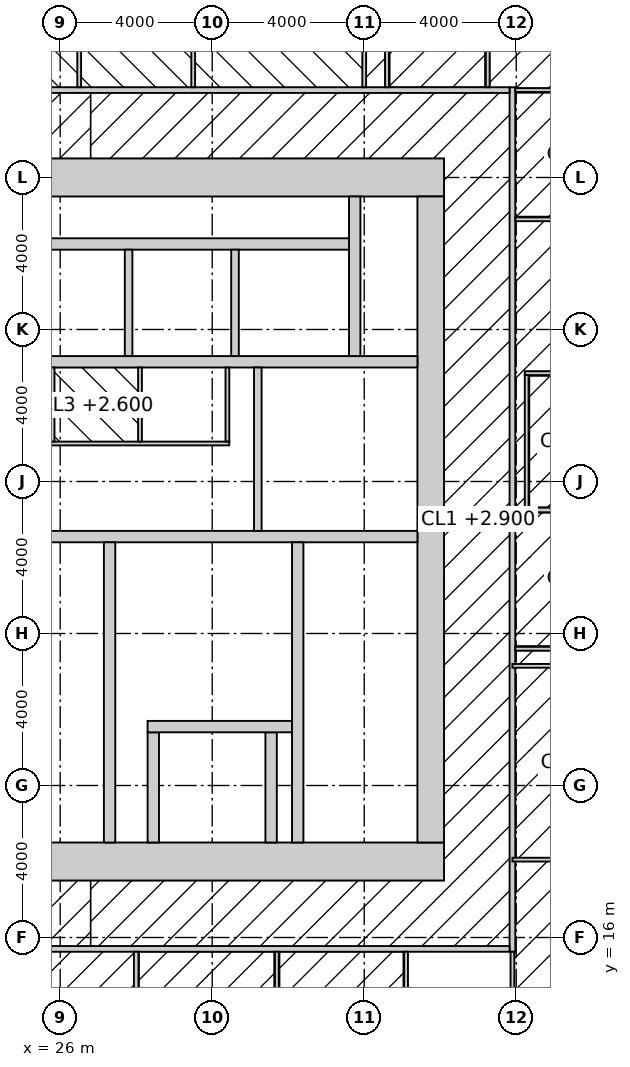
"""IFC4 building model, lengths in metres.
Left out: names, types, materials, properties, quantities, classifications, styles, units other than length and angle.
Written with IfcOpenShell. Run it as: python <this file> out.ifc"""

import sys

from ifc_helpers import new_model, si_unit, direction, frame, frame_2d, origin, place, context, subcontext, project, spatial, rectangle, extrude, element, fill, save


model = new_model("IFC4")
c1 = context("Model", 3, precision=1e-05, world=origin(), true_north=direction((0.0, 1.0)))
c2 = subcontext(c1, "Body", "Model", "MODEL_VIEW")
j1 = project(units=[si_unit("LENGTHUNIT", "METRE"), si_unit("PLANEANGLEUNIT", "RADIAN")], contexts=[c1])
p1 = place(None, origin())
s1 = spatial("IfcSite", under=j1, at=p1, CompositionType="ELEMENT")
p2 = place(p1, origin())
s2 = spatial("IfcBuilding", under=s1, at=p2, CompositionType="ELEMENT")
p3 = place(p2, frame((0.0, 0.0, 93.4)))
s3 = spatial("IfcBuildingStorey", under=s2, at=p3, CompositionType="ELEMENT", Elevation=93.4)
p4 = place(p3, frame((18.5, 18.0, -0.15), z_axis=(0.0, 0.0, 1.0), x_axis=(1.0, 0.0, 0.0)))
e1 = element("IfcWall", 1, at=p4, inside=s3, PredefinedType="SHEAR", context=c2, shape_type="SweptSolid", body=[
    extrude(rectangle(XDim=17.6, YDim=1.0, at=frame_2d((8.8, 0.0))), origin(), (0.0, 0.0, 1.0), 4.0),
])
p5 = place(p4, frame((3.45, 0.0, 0.15)))
e2 = element("IfcOpeningElement", 2, at=p5, cuts=e1, PredefinedType="OPENING", context=c2, shape_type="SweptSolid", body=[
    extrude(rectangle(XDim=1.5, YDim=2.4, at=frame_2d((0.75, 1.2))), frame((0.0, 0.51, 0.0), z_axis=(0.0, -1.0, 0.0), x_axis=(1.0, 0.0, 0.0)), (0.0, 0.0, 1.0), 1.02),
])
p6 = place(p3, frame((18.5, 36.0, -0.15), z_axis=(0.0, 0.0, 1.0), x_axis=(1.0, 0.0, 0.0)))
e3 = element("IfcWall", 3, at=p6, inside=s3, PredefinedType="SHEAR", context=c2, shape_type="SweptSolid", body=[
    extrude(rectangle(XDim=17.6, YDim=1.0, at=frame_2d((8.8, 0.0))), origin(), (0.0, 0.0, 1.0), 4.0),
])
p7 = place(p3, frame((35.75, 18.5, -0.15), z_axis=(0.0, 0.0, 1.0), x_axis=(0.0, 1.0, 0.0)))
e4 = element("IfcWall", 4, at=p7, inside=s3, PredefinedType="SHEAR", context=c2, shape_type="SweptSolid", body=[
    extrude(rectangle(XDim=17.0, YDim=0.7, at=frame_2d((8.5, 0.0))), origin(), (0.0, 0.0, 1.0), 4.0),
])
p8 = place(p7, frame((9.85, 0.0, 0.15)))
e5 = element("IfcOpeningElement", 5, at=p8, cuts=e4, PredefinedType="OPENING", context=c2, shape_type="SweptSolid", body=[
    extrude(rectangle(XDim=1.0, YDim=2.2, at=frame_2d((0.5, 1.1))), frame((0.0, 0.36, 0.0), z_axis=(0.0, -1.0, 0.0), x_axis=(1.0, 0.0, 0.0)), (0.0, 0.0, 1.0), 0.72),
])
p9 = place(p3, frame((24.15, 26.55, -0.15), z_axis=(0.0, 0.0, 1.0), x_axis=(1.0, 0.0, 0.0)))
e6 = element("IfcWall", 6, at=p9, inside=s3, PredefinedType="SHEAR", context=c2, shape_type="SweptSolid", body=[
    extrude(rectangle(XDim=11.25, YDim=0.3, at=frame_2d((5.625, 0.0))), origin(), (0.0, 0.0, 1.0), 4.0),
])
p10 = place(p9, frame((9.25, 0.0, 0.15)))
e7 = element("IfcOpeningElement", 7, at=p10, cuts=e6, PredefinedType="OPENING", context=c2, shape_type="SweptSolid", body=[
    extrude(rectangle(XDim=1.0, YDim=2.2, at=frame_2d((0.5, 1.1))), frame((0.0, 0.16, 0.0), z_axis=(0.0, -1.0, 0.0), x_axis=(1.0, 0.0, 0.0)), (0.0, 0.0, 1.0), 0.32),
])
p11 = place(p9, frame((4.9, 0.0, 0.15)))
e8 = element("IfcOpeningElement", 8, at=p11, cuts=e6, PredefinedType="OPENING", context=c2, shape_type="SweptSolid", body=[
    extrude(rectangle(XDim=1.5, YDim=2.4, at=frame_2d((0.75, 1.2))), frame((0.0, 0.16, 0.0), z_axis=(0.0, -1.0, 0.0), x_axis=(1.0, 0.0, 0.0)), (0.0, 0.0, 1.0), 0.32),
])
p12 = place(p3, frame((27.3, 18.5, -0.15), z_axis=(0.0, 0.0, 1.0), x_axis=(0.0, 1.0, 0.0)))
e9 = element("IfcWall", 9, at=p12, inside=s3, PredefinedType="SHEAR", context=c2, shape_type="SweptSolid", body=[
    extrude(rectangle(XDim=7.9, YDim=0.3, at=frame_2d((3.95, 0.0))), origin(), (0.0, 0.0, 1.0), 4.0),
])
p13 = place(p12, frame((6.4, 0.0, 0.15)))
e10 = element("IfcOpeningElement", 10, at=p13, cuts=e9, PredefinedType="OPENING", context=c2, shape_type="SweptSolid", body=[
    extrude(rectangle(XDim=1.0, YDim=2.2, at=frame_2d((0.5, 1.1))), frame((0.0, 0.16, 0.0), z_axis=(0.0, -1.0, 0.0), x_axis=(1.0, 0.0, 0.0)), (0.0, 0.0, 1.0), 0.32),
])
p14 = place(p3, frame((32.25, 18.5, -0.15), z_axis=(0.0, 0.0, 1.0), x_axis=(0.0, 1.0, 0.0)))
e11 = element("IfcWall", 11, at=p14, inside=s3, PredefinedType="SHEAR", context=c2, shape_type="SweptSolid", body=[
    extrude(rectangle(XDim=7.9, YDim=0.3, at=frame_2d((3.95, 0.0))), origin(), (0.0, 0.0, 1.0), 4.0),
])
for number, where, z_axis, x_axis in (
    (12, (28.45, 18.5, -0.15), (0.0, 0.0, 1.0), (0.0, 1.0, 0.0)),
    (13, (31.55, 18.5, -0.15), (0.0, 0.0, 1.0), (0.0, 1.0, 0.0)),
):
    element("IfcWall", number, at=place(p3, frame(where, z_axis=z_axis, x_axis=x_axis)), inside=s3, PredefinedType="SHEAR", context=c2, shape_type="SweptSolid", body=[
        extrude(rectangle(XDim=2.9, YDim=0.3, at=frame_2d((1.45, 0.0))), origin(), (0.0, 0.0, 1.0), 4.0),
    ])
p15 = place(p3, frame((28.3, 21.55, -0.15), z_axis=(0.0, 0.0, 1.0), x_axis=(1.0, 0.0, 0.0)))
e14 = element("IfcWall", 14, at=p15, inside=s3, PredefinedType="SHEAR", context=c2, shape_type="SweptSolid", body=[
    extrude(rectangle(XDim=3.8, YDim=0.3, at=frame_2d((1.9, 0.0))), origin(), (0.0, 0.0, 1.0), 4.0),
])
p16 = place(p15, frame((1.05, 0.0, 0.15)))
e15 = element("IfcOpeningElement", 15, at=p16, cuts=e14, PredefinedType="OPENING", context=c2, shape_type="SweptSolid", body=[
    extrude(rectangle(XDim=1.3, YDim=2.4, at=frame_2d((0.65, 1.2))), frame((0.0, 0.16, 0.0), z_axis=(0.0, -1.0, 0.0), x_axis=(1.0, 0.0, 0.0)), (0.0, 0.0, 1.0), 0.32),
])
p17 = place(p3, frame((24.15, 31.15, -0.15), z_axis=(0.0, 0.0, 1.0), x_axis=(1.0, 0.0, 0.0)))
e16 = element("IfcWall", 16, at=p17, inside=s3, PredefinedType="SHEAR", context=c2, shape_type="SweptSolid", body=[
    extrude(rectangle(XDim=11.25, YDim=0.3, at=frame_2d((5.625, 0.0))), origin(), (0.0, 0.0, 1.0), 4.0),
])
p18 = place(p17, frame((7.25, 0.0, 0.15)))
e17 = element("IfcOpeningElement", 17, at=p18, cuts=e16, PredefinedType="OPENING", context=c2, shape_type="SweptSolid", body=[
    extrude(rectangle(XDim=1.4, YDim=2.4, at=frame_2d((0.7, 1.2))), frame((0.0, 0.16, 0.0), z_axis=(0.0, -1.0, 0.0), x_axis=(1.0, 0.0, 0.0)), (0.0, 0.0, 1.0), 0.32),
])
p19 = place(p3, frame((33.75, 31.3, -0.15), z_axis=(0.0, 0.0, 1.0), x_axis=(0.0, 1.0, 0.0)))
e18 = element("IfcWall", 18, at=p19, inside=s3, PredefinedType="SHEAR", context=c2, shape_type="SweptSolid", body=[
    extrude(rectangle(XDim=4.2, YDim=0.3, at=frame_2d((2.1, 0.0))), origin(), (0.0, 0.0, 1.0), 4.0),
])
p20 = place(p3, frame((25.0, 34.25, -0.15), z_axis=(0.0, 0.0, 1.0), x_axis=(1.0, 0.0, 0.0)))
e19 = element("IfcWall", 19, at=p20, inside=s3, PredefinedType="SHEAR", context=c2, shape_type="SweptSolid", body=[
    extrude(rectangle(XDim=8.6, YDim=0.3, at=frame_2d((4.3, 0.0))), origin(), (0.0, 0.0, 1.0), 4.0),
])
for number, where, z_axis, x_axis in (
    (20, (27.8, 31.3, -0.15), (0.0, 0.0, 1.0), (0.0, 1.0, 0.0)),
    (21, (30.6, 31.3, -0.15), (0.0, 0.0, 1.0), (0.0, 1.0, 0.0)),
):
    element("IfcWall", number, at=place(p3, frame(where, z_axis=z_axis, x_axis=x_axis)), inside=s3, PredefinedType="SOLIDWALL", context=c2, shape_type="SweptSolid", body=[
        extrude(rectangle(XDim=2.8, YDim=0.2, at=frame_2d((1.4, 0.0))), origin(), (0.0, 0.0, 1.0), 4.0),
    ])
p21 = place(p3, frame((31.2, 26.7, 0.0), z_axis=(0.0, 0.0, 1.0), x_axis=(0.0, 1.0, 0.0)))
e22 = element("IfcWall", 22, at=p21, inside=s3, PredefinedType="SOLIDWALL", context=c2, shape_type="SweptSolid", body=[
    extrude(rectangle(XDim=4.3, YDim=0.2, at=frame_2d((2.15, 0.0))), origin(), (0.0, 0.0, 1.0), 3.85),
])
p22 = place(p3, frame((25.75, 29.0, 0.0), z_axis=(0.0, 0.0, 1.0), x_axis=(1.0, 0.0, 0.0)))
e23 = element("IfcWall", 23, at=p22, inside=s3, PredefinedType="PARTITIONING", context=c2, shape_type="SweptSolid", body=[
    extrude(rectangle(XDim=4.7, YDim=0.1, at=frame_2d((2.35, 0.0))), origin(), (0.0, 0.0, 1.0), 3.85),
])
p23 = place(p22, frame((0.7, 0.0, 0.0)))
e24 = element("IfcOpeningElement", 24, at=p23, cuts=e23, PredefinedType="OPENING", context=c2, shape_type="SweptSolid", body=[
    extrude(rectangle(XDim=1.0, YDim=2.2, at=frame_2d((0.5, 1.1))), frame((0.0, 0.06, 0.0), z_axis=(0.0, -1.0, 0.0), x_axis=(1.0, 0.0, 0.0)), (0.0, 0.0, 1.0), 0.12),
])
p24 = place(p22, frame((3.0, 0.0, 0.0)))
e25 = element("IfcOpeningElement", 25, at=p24, cuts=e23, PredefinedType="OPENING", context=c2, shape_type="SweptSolid", body=[
    extrude(rectangle(XDim=1.0, YDim=2.2, at=frame_2d((0.5, 1.1))), frame((0.0, 0.06, 0.0), z_axis=(0.0, -1.0, 0.0), x_axis=(1.0, 0.0, 0.0)), (0.0, 0.0, 1.0), 0.12),
])
for number, where, z_axis, x_axis in (
    (26, (25.8, 29.05, 0.0), (0.0, 0.0, 1.0), (0.0, 1.0, 0.0)),
    (27, (30.4, 29.05, 0.0), (0.0, 0.0, 1.0), (0.0, 1.0, 0.0)),
    (28, (28.1, 29.05, 0.0), (0.0, 0.0, 1.0), (0.0, 1.0, 0.0)),
):
    element("IfcWall", number, at=place(p3, frame(where, z_axis=z_axis, x_axis=x_axis)), inside=s3, PredefinedType="PARTITIONING", context=c2, shape_type="SweptSolid", body=[
        extrude(rectangle(XDim=1.95, YDim=0.1, at=frame_2d((0.975, 0.0))), origin(), (0.0, 0.0, 1.0), 3.85),
    ])
p25 = place(p3, frame((37.9, 15.625, 0.0), z_axis=(0.0, 0.0, 1.0), x_axis=(0.0, 1.0, 0.0)))
e29 = element("IfcWall", 29, at=p25, inside=s3, PredefinedType="PARTITIONING", context=c2, shape_type="SweptSolid", body=[
    extrude(rectangle(XDim=22.75, YDim=0.15, at=frame_2d((11.375, 0.0))), origin(), (0.0, 0.0, 1.0), 2.95),
])
p26 = place(p25, frame((4.974, 0.0, 0.0)))
e30 = element("IfcOpeningElement", 30, at=p26, cuts=e29, PredefinedType="OPENING", context=c2, shape_type="SweptSolid", body=[
    extrude(rectangle(XDim=1.8, YDim=2.4, at=frame_2d((0.9, 1.2))), frame((0.0, 0.085, 0.0), z_axis=(0.0, -1.0, 0.0), x_axis=(1.0, 0.0, 0.0)), (0.0, 0.0, 1.0), 0.17),
])
p27 = place(p25, frame((16.226, 0.0, 0.0)))
e31 = element("IfcOpeningElement", 31, at=p27, cuts=e29, PredefinedType="OPENING", context=c2, shape_type="SweptSolid", body=[
    extrude(rectangle(XDim=1.8, YDim=2.4, at=frame_2d((0.9, 1.2))), frame((0.0, 0.085, 0.0), z_axis=(0.0, -1.0, 0.0), x_axis=(1.0, 0.0, 0.0)), (0.0, 0.0, 1.0), 0.17),
])
p28 = place(p3, frame((15.775, 15.7, 0.0), z_axis=(0.0, 0.0, 1.0), x_axis=(1.0, 0.0, 0.0)))
e32 = element("IfcWall", 32, at=p28, inside=s3, PredefinedType="PARTITIONING", context=c2, shape_type="SweptSolid", body=[
    extrude(rectangle(XDim=22.05, YDim=0.15, at=frame_2d((11.025, 0.0))), origin(), (0.0, 0.0, 1.0), 3.85),
])
p29 = place(p3, frame((15.775, 38.3, 0.0), z_axis=(0.0, 0.0, 1.0), x_axis=(1.0, 0.0, 0.0)))
e33 = element("IfcWall", 33, at=p29, inside=s3, PredefinedType="PARTITIONING", context=c2, shape_type="SweptSolid", body=[
    extrude(rectangle(XDim=22.05, YDim=0.15, at=frame_2d((11.025, 0.0))), origin(), (0.0, 0.0, 1.0), 3.85),
])
p30 = place(p29, frame((7.975, 0.0, 0.0)))
e34 = element("IfcOpeningElement", 34, at=p30, cuts=e33, PredefinedType="OPENING", context=c2, shape_type="SweptSolid", body=[
    extrude(rectangle(XDim=0.9, YDim=2.1, at=frame_2d((0.45, 1.05))), frame((0.0, 0.085, 0.0), z_axis=(0.0, -1.0, 0.0), x_axis=(1.0, 0.0, 0.0)), (0.0, 0.0, 1.0), 0.17),
])
p31 = place(p29, frame((11.725, 0.0, 0.0)))
e35 = element("IfcOpeningElement", 35, at=p31, cuts=e33, PredefinedType="OPENING", context=c2, shape_type="SweptSolid", body=[
    extrude(rectangle(XDim=1.0, YDim=2.1, at=frame_2d((0.5, 1.05))), frame((0.0, 0.085, 0.0), z_axis=(0.0, -1.0, 0.0), x_axis=(1.0, 0.0, 0.0)), (0.0, 0.0, 1.0), 0.17),
])
p32 = place(p29, frame((15.575, 0.0, 0.0)))
e36 = element("IfcOpeningElement", 36, at=p32, cuts=e33, PredefinedType="OPENING", context=c2, shape_type="SweptSolid", body=[
    extrude(rectangle(XDim=0.9, YDim=2.1, at=frame_2d((0.45, 1.05))), frame((0.0, 0.085, 0.0), z_axis=(0.0, -1.0, 0.0), x_axis=(1.0, 0.0, 0.0)), (0.0, 0.0, 1.0), 0.17),
])
p33 = place(p3, frame((34.0, 38.375, 0.0), z_axis=(0.0, 0.0, 1.0), x_axis=(0.0, 1.0, 0.0)))
e37 = element("IfcWall", 37, at=p33, inside=s3, PredefinedType="PARTITIONING", context=c2, shape_type="SweptSolid", body=[
    extrude(rectangle(XDim=3.675, YDim=0.1, at=frame_2d((1.837, 0.0))), origin(), (0.0, 0.0, 1.0), 2.95),
])
for number, where, z_axis, x_axis in (
    (38, (26.5, 38.375, 0.0), (0.0, 0.0, 1.0), (0.0, 1.0, 0.0)),
    (39, (29.5, 38.375, 0.0), (0.0, 0.0, 1.0), (0.0, 1.0, 0.0)),
):
    element("IfcWall", number, at=place(p3, frame(where, z_axis=z_axis, x_axis=x_axis)), inside=s3, PredefinedType="PARTITIONING", context=c2, shape_type="SweptSolid", body=[
        extrude(rectangle(XDim=3.575, YDim=0.1, at=frame_2d((1.788, 0.0))), origin(), (0.0, 0.0, 1.0), 3.85),
    ])
p34 = place(p3, frame((28.0, 0.3, 0.0), z_axis=(0.0, 0.0, 1.0), x_axis=(0.0, 1.0, 0.0)))
e40 = element("IfcWall", 40, at=p34, inside=s3, PredefinedType="PARTITIONING", context=c2, shape_type="SweptSolid", body=[
    extrude(rectangle(XDim=15.325, YDim=0.12, at=frame_2d((7.663, 0.0))), origin(), (0.0, 0.0, 1.0), 3.85),
])
p35 = place(p3, frame((37.975, 27.25, 0.0), z_axis=(0.0, 0.0, 1.0), x_axis=(1.0, 0.0, 0.0)))
e41 = element("IfcWall", 41, at=p35, inside=s3, PredefinedType="PARTITIONING", context=c2, shape_type="SweptSolid", body=[
    extrude(rectangle(XDim=19.725, YDim=0.12, at=frame_2d((9.862, 0.0))), origin(), (0.0, 0.0, 1.0), 3.85),
])
p36 = place(p3, frame((37.975, 23.599, 0.0), z_axis=(0.0, 0.0, 1.0), x_axis=(1.0, 0.0, 0.0)))
e42 = element("IfcWall", 42, at=p36, inside=s3, PredefinedType="PARTITIONING", context=c2, shape_type="SweptSolid", body=[
    extrude(rectangle(XDim=4.775, YDim=0.1, at=frame_2d((2.387, 0.0))), origin(), (0.0, 0.0, 1.0), 2.95),
])
p37 = place(p3, frame((38.225, 30.85, 0.0), z_axis=(0.0, 0.0, 1.0), x_axis=(1.0, 0.0, 0.0)))
e43 = element("IfcWall", 43, at=p37, inside=s3, PredefinedType="PARTITIONING", context=c2, shape_type="SweptSolid", body=[
    extrude(rectangle(XDim=3.8, YDim=0.1, at=frame_2d((1.9, 0.0))), origin(), (0.0, 0.0, 1.0), 3.85),
])
p38 = place(p37, frame((1.4, 0.0, 0.0)))
e44 = element("IfcOpeningElement", 44, at=p38, cuts=e43, PredefinedType="OPENING", context=c2, shape_type="SweptSolid", body=[
    extrude(rectangle(XDim=1.0, YDim=2.2, at=frame_2d((0.5, 1.1))), frame((0.0, 0.06, 0.0), z_axis=(0.0, -1.0, 0.0), x_axis=(1.0, 0.0, 0.0)), (0.0, 0.0, 1.0), 0.12),
])
for number, where, z_axis, x_axis in (
    (45, (37.975, 34.9, 0.0), (0.0, 0.0, 1.0), (1.0, 0.0, 0.0)),
    (46, (37.975, 38.3, 0.0), (0.0, 0.0, 1.0), (1.0, 0.0, 0.0)),
):
    element("IfcWall", number, at=place(p3, frame(where, z_axis=z_axis, x_axis=x_axis)), inside=s3, PredefinedType="PARTITIONING", context=c2, shape_type="SweptSolid", body=[
        extrude(rectangle(XDim=4.775, YDim=0.1, at=frame_2d((2.387, 0.0))), origin(), (0.0, 0.0, 1.0), 3.85),
    ])
p39 = place(p3, frame((31.701, 11.55, 0.0), z_axis=(0.0, 0.0, 1.0), x_axis=(0.0, 1.0, 0.0)))
e47 = element("IfcWall", 47, at=p39, inside=s3, PredefinedType="PARTITIONING", context=c2, shape_type="SweptSolid", body=[
    extrude(rectangle(XDim=4.075, YDim=0.1, at=frame_2d((2.038, 0.0))), origin(), (0.0, 0.0, 1.0), 3.85),
])
p40 = place(p3, frame((34.6, 38.375, 0.0), z_axis=(0.0, 0.0, 1.0), x_axis=(0.0, 1.0, 0.0)))
e48 = element("IfcWall", 48, at=p40, inside=s3, PredefinedType="PARTITIONING", context=c2, shape_type="SweptSolid", body=[
    extrude(rectangle(XDim=3.475, YDim=0.1, at=frame_2d((1.738, 0.0))), origin(), (0.0, 0.0, 1.0), 3.85),
])
p41 = place(p3, frame((35.101, 11.55, 0.0), z_axis=(0.0, 0.0, 1.0), x_axis=(0.0, 1.0, 0.0)))
e49 = element("IfcWall", 49, at=p41, inside=s3, PredefinedType="PARTITIONING", context=c2, shape_type="SweptSolid", body=[
    extrude(rectangle(XDim=4.075, YDim=0.1, at=frame_2d((2.038, 0.0))), origin(), (0.0, 0.0, 1.0), 3.85),
])
p42 = place(p3, frame((37.25, 38.375, 0.0), z_axis=(0.0, 0.0, 1.0), x_axis=(0.0, 1.0, 0.0)))
e50 = element("IfcWall", 50, at=p42, inside=s3, PredefinedType="PARTITIONING", context=c2, shape_type="SweptSolid", body=[
    extrude(rectangle(XDim=3.475, YDim=0.1, at=frame_2d((1.738, 0.0))), origin(), (0.0, 0.0, 1.0), 3.85),
])
p43 = place(p3, frame((37.9, 11.55, 0.0), z_axis=(0.0, 0.0, 1.0), x_axis=(0.0, 1.0, 0.0)))
e51 = element("IfcWall", 51, at=p43, inside=s3, PredefinedType="PARTITIONING", context=c2, shape_type="SweptSolid", body=[
    extrude(rectangle(XDim=4.075, YDim=0.1, at=frame_2d((2.038, 0.0))), origin(), (0.0, 0.0, 1.0), 2.95),
])
p44 = place(p3, frame((38.275, 27.31, 0.0), z_axis=(0.0, 0.0, 1.0), x_axis=(0.0, 1.0, 0.0)))
e52 = element("IfcWall", 52, at=p44, inside=s3, PredefinedType="PARTITIONING", context=c2, shape_type="SweptSolid", body=[
    extrude(rectangle(XDim=3.49, YDim=0.1, at=frame_2d((1.745, 0.0))), origin(), (0.0, 0.0, 1.0), 3.85),
])
for number, where, z_axis, x_axis in (
    (53, (37.9, 18.049, 0.0), (0.0, 0.0, 1.0), (1.0, 0.0, 0.0)),
    (54, (42.4, 23.149, 0.0), (0.0, 0.0, 1.0), (-1.0, 0.0, 0.0)),
):
    element("IfcWall", number, at=place(p3, frame(where, z_axis=z_axis, x_axis=x_axis)), inside=s3, PredefinedType="PARTITIONING", context=c2, shape_type="SweptSolid", body=[
        extrude(rectangle(XDim=4.5, YDim=0.1, at=frame_2d((2.25, 0.0))), origin(), (0.0, 0.0, 1.0), 3.85),
    ])
p45 = place(p13, origin())
e55 = element("IfcDoor", 55, at=p45, inside=s3, OperationType="SINGLE_SWING_RIGHT", PredefinedType="DOOR", context=c2, shape_type="SweptSolid", body=[
    extrude(rectangle(XDim=1.0, YDim=2.2, at=frame_2d((0.5, 1.1))), frame((0.0, 0.025, 0.0), z_axis=(0.0, -1.0, 0.0), x_axis=(1.0, 0.0, 0.0)), (0.0, 0.0, 1.0), 0.05),
])
fill(e10, e55)
p46 = place(p10, frame((1.0, 0.0, 0.0), z_axis=(0.0, 0.0, 1.0), x_axis=(-1.0, 0.0, 0.0)))
e56 = element("IfcDoor", 56, at=p46, inside=s3, OperationType="SINGLE_SWING_RIGHT", PredefinedType="DOOR", context=c2, shape_type="SweptSolid", body=[
    extrude(rectangle(XDim=1.0, YDim=2.2, at=frame_2d((0.5, 1.1))), frame((0.0, 0.025, 0.0), z_axis=(0.0, -1.0, 0.0), x_axis=(1.0, 0.0, 0.0)), (0.0, 0.0, 1.0), 0.05),
])
fill(e7, e56)
p47 = place(p8, origin())
e57 = element("IfcDoor", 57, at=p47, inside=s3, OperationType="SINGLE_SWING_RIGHT", PredefinedType="DOOR", context=c2, shape_type="SweptSolid", body=[
    extrude(rectangle(XDim=1.0, YDim=2.2, at=frame_2d((0.5, 1.1))), frame((0.0, 0.025, 0.0), z_axis=(0.0, -1.0, 0.0), x_axis=(1.0, 0.0, 0.0)), (0.0, 0.0, 1.0), 0.05),
])
fill(e5, e57)
p48 = place(p11, origin())
e58 = element("IfcDoor", 58, at=p48, inside=s3, OperationType="DOUBLE_DOOR_DOUBLE_SWING", PredefinedType="DOOR", context=c2, shape_type="SweptSolid", body=[
    extrude(rectangle(XDim=1.5, YDim=2.4, at=frame_2d((0.75, 1.2))), frame((0.0, 0.025, 0.0), z_axis=(0.0, -1.0, 0.0), x_axis=(1.0, 0.0, 0.0)), (0.0, 0.0, 1.0), 0.05),
])
fill(e8, e58)
p49 = place(p23, origin())
e59 = element("IfcDoor", 59, at=p49, inside=s3, OperationType="SINGLE_SWING_LEFT", PredefinedType="DOOR", context=c2, shape_type="SweptSolid", body=[
    extrude(rectangle(XDim=1.0, YDim=2.2, at=frame_2d((0.5, 1.1))), frame((0.0, 0.025, 0.0), z_axis=(0.0, -1.0, 0.0), x_axis=(1.0, 0.0, 0.0)), (0.0, 0.0, 1.0), 0.05),
])
fill(e24, e59)
p50 = place(p24, origin())
e60 = element("IfcDoor", 60, at=p50, inside=s3, OperationType="SINGLE_SWING_LEFT", PredefinedType="DOOR", context=c2, shape_type="SweptSolid", body=[
    extrude(rectangle(XDim=1.0, YDim=2.2, at=frame_2d((0.5, 1.1))), frame((0.0, 0.025, 0.0), z_axis=(0.0, -1.0, 0.0), x_axis=(1.0, 0.0, 0.0)), (0.0, 0.0, 1.0), 0.05),
])
fill(e25, e60)
p51 = place(p31, origin())
e61 = element("IfcDoor", 61, at=p51, inside=s3, OperationType="SLIDING_TO_LEFT", PredefinedType="DOOR", context=c2, shape_type="SweptSolid", body=[
    extrude(rectangle(XDim=1.0, YDim=2.1, at=frame_2d((0.5, 1.05))), frame((0.0, 0.025, 0.0), z_axis=(0.0, -1.0, 0.0), x_axis=(1.0, 0.0, 0.0)), (0.0, 0.0, 1.0), 0.05),
])
fill(e35, e61)
p52 = place(p32, origin())
e62 = element("IfcDoor", 62, at=p52, inside=s3, OperationType="SINGLE_SWING_LEFT", PredefinedType="DOOR", context=c2, shape_type="SweptSolid", body=[
    extrude(rectangle(XDim=0.9, YDim=2.1, at=frame_2d((0.45, 1.05))), frame((0.0, 0.025, 0.0), z_axis=(0.0, -1.0, 0.0), x_axis=(1.0, 0.0, 0.0)), (0.0, 0.0, 1.0), 0.05),
])
fill(e36, e62)
p53 = place(p26, origin())
e63 = element("IfcDoor", 63, at=p53, inside=s3, OperationType="DOUBLE_DOOR_DOUBLE_SWING", PredefinedType="DOOR", context=c2, shape_type="SweptSolid", body=[
    extrude(rectangle(XDim=1.8, YDim=2.4, at=frame_2d((0.9, 1.2))), frame((0.0, 0.025, 0.0), z_axis=(0.0, -1.0, 0.0), x_axis=(1.0, 0.0, 0.0)), (0.0, 0.0, 1.0), 0.05),
])
fill(e30, e63)
p54 = place(p27, origin())
e64 = element("IfcDoor", 64, at=p54, inside=s3, OperationType="DOUBLE_DOOR_DOUBLE_SWING", PredefinedType="DOOR", context=c2, shape_type="SweptSolid", body=[
    extrude(rectangle(XDim=1.8, YDim=2.4, at=frame_2d((0.9, 1.2))), frame((0.0, 0.025, 0.0), z_axis=(0.0, -1.0, 0.0), x_axis=(1.0, 0.0, 0.0)), (0.0, 0.0, 1.0), 0.05),
])
fill(e31, e64)
p55 = place(p16, origin())
e65 = element("IfcDoor", 65, at=p55, inside=s3, OperationType="DOUBLE_DOOR_SLIDING", PredefinedType="DOOR", context=c2, shape_type="SweptSolid", body=[
    extrude(rectangle(XDim=1.3, YDim=2.4, at=frame_2d((0.65, 1.2))), frame((0.0, 0.025, 0.0), z_axis=(0.0, -1.0, 0.0), x_axis=(1.0, 0.0, 0.0)), (0.0, 0.0, 1.0), 0.05),
])
fill(e15, e65)
p56 = place(p18, origin())
e66 = element("IfcDoor", 66, at=p56, inside=s3, OperationType="DOUBLE_DOOR_SLIDING", PredefinedType="DOOR", context=c2, shape_type="SweptSolid", body=[
    extrude(rectangle(XDim=1.4, YDim=2.4, at=frame_2d((0.7, 1.2))), frame((0.0, 0.025, 0.0), z_axis=(0.0, -1.0, 0.0), x_axis=(1.0, 0.0, 0.0)), (0.0, 0.0, 1.0), 0.05),
])
fill(e17, e66)
save(model, sys.argv[1])
